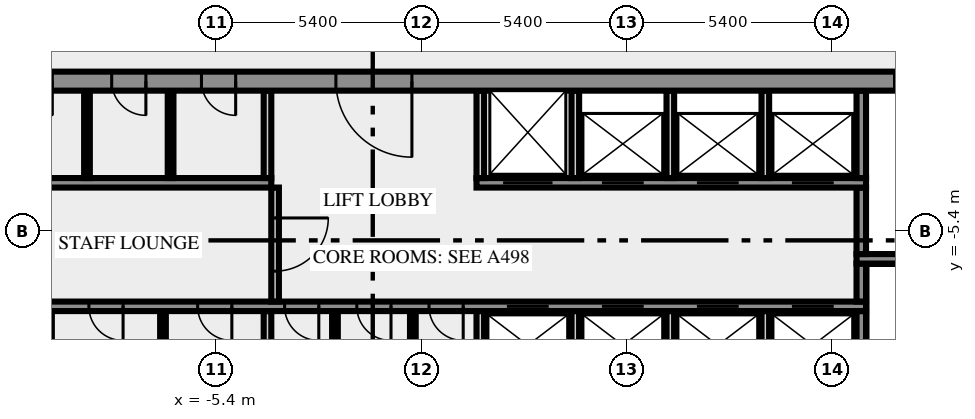
"""IFC4 building model, lengths in metres.
Left out: names, types, materials, properties, quantities, classifications, styles, units other than length and angle.
Written with IfcOpenShell. Run it as: python <this file> out.ifc"""

import sys

from ifc_helpers import new_model, si_unit, direction, frame, frame_2d, origin, place, context, subcontext, project, spatial, rectangle, extrude, element, fill, save


model = new_model("IFC4")
c1 = context("Model", 3, precision=1e-05, world=origin(), true_north=direction((0.0, 1.0)))
c2 = subcontext(c1, "Body", "Model", "MODEL_VIEW")
j1 = project(units=[si_unit("LENGTHUNIT", "METRE"), si_unit("PLANEANGLEUNIT", "RADIAN")], contexts=[c1])
p1 = place(None, origin())
s1 = spatial("IfcSite", under=j1, at=p1, CompositionType="ELEMENT")
p2 = place(p1, origin())
s2 = spatial("IfcBuilding", under=s1, at=p2, CompositionType="ELEMENT")
p3 = place(p2, frame((0.0, 0.0, 226.0)))
s3 = spatial("IfcBuildingStorey", under=s2, at=p3, CompositionType="ELEMENT", Elevation=226.0)
p4 = place(p3, frame((-6.8, -10.5, 0.0), z_axis=(0.0, 0.0, 1.0), x_axis=(0.0, 1.0, 0.0)))
e1 = element("IfcWall", 1, at=p4, inside=s3, PredefinedType="PARTITIONING", context=c2, shape_type="SweptSolid", body=[
    extrude(rectangle(XDim=3.0, YDim=0.15, at=frame_2d((1.5, 0.0))), origin(), (0.0, 0.0, 1.0), 3.65),
])
p5 = place(p3, frame((-4.05, -10.5, 0.0), z_axis=(0.0, 0.0, 1.0), x_axis=(0.0, 1.0, 0.0)))
e2 = element("IfcWall", 2, at=p5, inside=s3, PredefinedType="SOLIDWALL", context=c2, shape_type="SweptSolid", body=[
    extrude(rectangle(XDim=3.0, YDim=0.2, at=frame_2d((1.5, 0.0))), origin(), (0.0, 0.0, 1.0), 3.65),
])
for number, where, z_axis, x_axis in (
    (3, (-2.275, -10.5, 0.0), (0.0, 0.0, 1.0), (0.0, 1.0, 0.0)),
    (4, (-0.225, -10.5, 0.0), (0.0, 0.0, 1.0), (0.0, 1.0, 0.0)),
):
    element("IfcWall", number, at=place(p3, frame(where, z_axis=z_axis, x_axis=x_axis)), inside=s3, PredefinedType="PARTITIONING", context=c2, shape_type="SweptSolid", body=[
        extrude(rectangle(XDim=3.0, YDim=0.15, at=frame_2d((1.5, 0.0))), origin(), (0.0, 0.0, 1.0), 3.65),
    ])
for number, where, z_axis, x_axis in (
    (5, (1.55, -10.5, 0.0), (0.0, 0.0, 1.0), (0.0, 1.0, 0.0)),
    (6, (4.05, -10.5, 0.0), (0.0, 0.0, 1.0), (0.0, 1.0, 0.0)),
    (7, (6.55, -10.5, 0.0), (0.0, 0.0, 1.0), (0.0, 1.0, 0.0)),
    (8, (9.05, -10.5, 0.0), (0.0, 0.0, 1.0), (0.0, 1.0, 0.0)),
):
    element("IfcWall", number, at=place(p3, frame(where, z_axis=z_axis, x_axis=x_axis)), inside=s3, PredefinedType="SOLIDWALL", context=c2, shape_type="SweptSolid", body=[
        extrude(rectangle(XDim=3.0, YDim=0.2, at=frame_2d((1.5, 0.0))), origin(), (0.0, 0.0, 1.0), 3.65),
    ])
p6 = place(p3, frame((11.575, -10.5, 0.0), z_axis=(0.0, 0.0, 1.0), x_axis=(0.0, 1.0, 0.0)))
e9 = element("IfcWall", 9, at=p6, inside=s3, PredefinedType="SHEAR", context=c2, shape_type="SweptSolid", body=[
    extrude(rectangle(XDim=3.0, YDim=0.25, at=frame_2d((1.5, 0.0))), origin(), (0.0, 0.0, 1.0), 3.65),
])
p7 = place(p3, frame((11.7, -7.375, 0.0), z_axis=(0.0, 0.0, 1.0), x_axis=(-1.0, 0.0, 0.0)))
e10 = element("IfcWall", 10, at=p7, inside=s3, PredefinedType="SHEAR", context=c2, shape_type="SweptSolid", body=[
    extrude(rectangle(XDim=23.4, YDim=0.25, at=frame_2d((11.7, 0.0))), origin(), (0.0, 0.0, 1.0), 3.65),
])
p8 = place(p7, frame((21.912, 0.0, 0.0)))
e11 = element("IfcOpeningElement", 11, at=p8, cuts=e10, PredefinedType="OPENING", context=c2, shape_type="SweptSolid", body=[
    extrude(rectangle(XDim=0.9, YDim=2.1, at=frame_2d((0.45, 1.05))), frame((0.0, 0.135, 0.0), z_axis=(0.0, -1.0, 0.0), x_axis=(1.0, 0.0, 0.0)), (0.0, 0.0, 1.0), 0.27),
])
p9 = place(p7, frame((19.55, 0.0, 0.0)))
e12 = element("IfcOpeningElement", 12, at=p9, cuts=e10, PredefinedType="OPENING", context=c2, shape_type="SweptSolid", body=[
    extrude(rectangle(XDim=0.9, YDim=2.1, at=frame_2d((0.45, 1.05))), frame((0.0, 0.135, 0.0), z_axis=(0.0, -1.0, 0.0), x_axis=(1.0, 0.0, 0.0)), (0.0, 0.0, 1.0), 0.27),
])
p10 = place(p7, frame((16.688, 0.0, 0.0)))
e13 = element("IfcOpeningElement", 13, at=p10, cuts=e10, PredefinedType="OPENING", context=c2, shape_type="SweptSolid", body=[
    extrude(rectangle(XDim=0.9, YDim=2.1, at=frame_2d((0.45, 1.05))), frame((0.0, 0.135, 0.0), z_axis=(0.0, -1.0, 0.0), x_axis=(1.0, 0.0, 0.0)), (0.0, 0.0, 1.0), 0.27),
])
p11 = place(p7, frame((14.4, 0.0, 0.0)))
e14 = element("IfcOpeningElement", 14, at=p11, cuts=e10, PredefinedType="OPENING", context=c2, shape_type="SweptSolid", body=[
    extrude(rectangle(XDim=0.9, YDim=2.1, at=frame_2d((0.45, 1.05))), frame((0.0, 0.135, 0.0), z_axis=(0.0, -1.0, 0.0), x_axis=(1.0, 0.0, 0.0)), (0.0, 0.0, 1.0), 0.27),
])
p12 = place(p7, frame((12.5, 0.0, 0.0)))
e15 = element("IfcOpeningElement", 15, at=p12, cuts=e10, PredefinedType="OPENING", context=c2, shape_type="SweptSolid", body=[
    extrude(rectangle(XDim=0.9, YDim=2.1, at=frame_2d((0.45, 1.05))), frame((0.0, 0.135, 0.0), z_axis=(0.0, -1.0, 0.0), x_axis=(1.0, 0.0, 0.0)), (0.0, 0.0, 1.0), 0.27),
])
p13 = place(p7, frame((10.6, 0.0, 0.0)))
e16 = element("IfcOpeningElement", 16, at=p13, cuts=e10, PredefinedType="OPENING", context=c2, shape_type="SweptSolid", body=[
    extrude(rectangle(XDim=0.9, YDim=2.1, at=frame_2d((0.45, 1.05))), frame((0.0, 0.135, 0.0), z_axis=(0.0, -1.0, 0.0), x_axis=(1.0, 0.0, 0.0)), (0.0, 0.0, 1.0), 0.27),
])
p14 = place(p7, frame((8.35, 0.0, 0.0)))
e17 = element("IfcOpeningElement", 17, at=p14, cuts=e10, PredefinedType="OPENING", context=c2, shape_type="SweptSolid", body=[
    extrude(rectangle(XDim=1.1, YDim=2.1, at=frame_2d((0.55, 1.05))), frame((0.0, 0.135, 0.0), z_axis=(0.0, -1.0, 0.0), x_axis=(1.0, 0.0, 0.0)), (0.0, 0.0, 1.0), 0.27),
])
p15 = place(p7, frame((5.85, 0.0, 0.0)))
e18 = element("IfcOpeningElement", 18, at=p15, cuts=e10, PredefinedType="OPENING", context=c2, shape_type="SweptSolid", body=[
    extrude(rectangle(XDim=1.1, YDim=2.1, at=frame_2d((0.55, 1.05))), frame((0.0, 0.135, 0.0), z_axis=(0.0, -1.0, 0.0), x_axis=(1.0, 0.0, 0.0)), (0.0, 0.0, 1.0), 0.27),
])
p16 = place(p7, frame((3.35, 0.0, 0.0)))
e19 = element("IfcOpeningElement", 19, at=p16, cuts=e10, PredefinedType="OPENING", context=c2, shape_type="SweptSolid", body=[
    extrude(rectangle(XDim=1.1, YDim=2.1, at=frame_2d((0.55, 1.05))), frame((0.0, 0.135, 0.0), z_axis=(0.0, -1.0, 0.0), x_axis=(1.0, 0.0, 0.0)), (0.0, 0.0, 1.0), 0.27),
])
p17 = place(p7, frame((0.85, 0.0, 0.0)))
e20 = element("IfcOpeningElement", 20, at=p17, cuts=e10, PredefinedType="OPENING", context=c2, shape_type="SweptSolid", body=[
    extrude(rectangle(XDim=1.1, YDim=2.1, at=frame_2d((0.55, 1.05))), frame((0.0, 0.135, 0.0), z_axis=(0.0, -1.0, 0.0), x_axis=(1.0, 0.0, 0.0)), (0.0, 0.0, 1.0), 0.27),
])
p18 = place(p3, frame((-3.85, -4.25, 0.0), z_axis=(0.0, 0.0, 1.0), x_axis=(0.0, -1.0, 0.0)))
e21 = element("IfcWall", 21, at=p18, inside=s3, PredefinedType="SOLIDWALL", context=c2, shape_type="SweptSolid", body=[
    extrude(rectangle(XDim=3.0, YDim=0.2, at=frame_2d((1.5, 0.0))), origin(), (0.0, 0.0, 1.0), 3.65),
])
p19 = place(p18, frame((0.8, 0.0, 0.0)))
e22 = element("IfcOpeningElement", 22, at=p19, cuts=e21, PredefinedType="OPENING", context=c2, shape_type="SweptSolid", body=[
    extrude(rectangle(XDim=1.4, YDim=2.1, at=frame_2d((0.7, 1.05))), frame((0.0, 0.11, 0.0), z_axis=(0.0, -1.0, 0.0), x_axis=(1.0, 0.0, 0.0)), (0.0, 0.0, 1.0), 0.22),
])
p20 = place(p3, frame((11.575, -7.25, 0.0), z_axis=(0.0, 0.0, 1.0), x_axis=(0.0, 1.0, 0.0)))
e23 = element("IfcWall", 23, at=p20, inside=s3, PredefinedType="SHEAR", context=c2, shape_type="SweptSolid", body=[
    extrude(rectangle(XDim=1.0, YDim=0.25, at=frame_2d((0.5, 0.0))), origin(), (0.0, 0.0, 1.0), 3.65),
])
p21 = place(p3, frame((19.5, -6.125, 0.0), z_axis=(0.0, 0.0, 1.0), x_axis=(-1.0, 0.0, 0.0)))
e24 = element("IfcWall", 24, at=p21, inside=s3, PredefinedType="SHEAR", context=c2, shape_type="SweptSolid", body=[
    extrude(rectangle(XDim=8.05, YDim=0.25, at=frame_2d((4.025, 0.0))), origin(), (0.0, 0.0, 1.0), 3.65),
])
p22 = place(p21, frame((0.05, 0.0, 0.0)))
e25 = element("IfcOpeningElement", 25, at=p22, cuts=e24, PredefinedType="OPENING", context=c2, shape_type="SweptSolid", body=[
    extrude(rectangle(XDim=1.8, YDim=2.1, at=frame_2d((0.9, 1.05))), frame((0.0, 0.135, 0.0), z_axis=(0.0, -1.0, 0.0), x_axis=(1.0, 0.0, 0.0)), (0.0, 0.0, 1.0), 0.27),
])
p23 = place(p3, frame((11.575, -6.0, 0.0), z_axis=(0.0, 0.0, 1.0), x_axis=(0.0, 1.0, 0.0)))
e26 = element("IfcWall", 26, at=p23, inside=s3, PredefinedType="SHEAR", context=c2, shape_type="SweptSolid", body=[
    extrude(rectangle(XDim=1.75, YDim=0.25, at=frame_2d((0.875, 0.0))), origin(), (0.0, 0.0, 1.0), 3.65),
])
p24 = place(p3, frame((-11.7, -4.125, 0.0), z_axis=(0.0, 0.0, 1.0), x_axis=(1.0, 0.0, 0.0)))
e27 = element("IfcWall", 27, at=p24, inside=s3, PredefinedType="SHEAR", context=c2, shape_type="SweptSolid", body=[
    extrude(rectangle(XDim=7.75, YDim=0.25, at=frame_2d((3.875, 0.0))), origin(), (0.0, 0.0, 1.0), 3.65),
])
p25 = place(p3, frame((1.45, -4.125, 0.0), z_axis=(0.0, 0.0, 1.0), x_axis=(1.0, 0.0, 0.0)))
e28 = element("IfcWall", 28, at=p25, inside=s3, PredefinedType="SHEAR", context=c2, shape_type="SweptSolid", body=[
    extrude(rectangle(XDim=10.25, YDim=0.25, at=frame_2d((5.125, 0.0))), origin(), (0.0, 0.0, 1.0), 3.65),
])
p26 = place(p25, frame((0.7, 0.0, 0.0)))
e29 = element("IfcOpeningElement", 29, at=p26, cuts=e28, PredefinedType="OPENING", context=c2, shape_type="SweptSolid", body=[
    extrude(rectangle(XDim=1.3, YDim=2.1, at=frame_2d((0.65, 1.05))), frame((0.0, 0.135, 0.0), z_axis=(0.0, -1.0, 0.0), x_axis=(1.0, 0.0, 0.0)), (0.0, 0.0, 1.0), 0.27),
])
p27 = place(p25, frame((3.3, 0.0, 0.0)))
e30 = element("IfcOpeningElement", 30, at=p27, cuts=e28, PredefinedType="OPENING", context=c2, shape_type="SweptSolid", body=[
    extrude(rectangle(XDim=1.1, YDim=2.1, at=frame_2d((0.55, 1.05))), frame((0.0, 0.135, 0.0), z_axis=(0.0, -1.0, 0.0), x_axis=(1.0, 0.0, 0.0)), (0.0, 0.0, 1.0), 0.27),
])
p28 = place(p25, frame((5.8, 0.0, 0.0)))
e31 = element("IfcOpeningElement", 31, at=p28, cuts=e28, PredefinedType="OPENING", context=c2, shape_type="SweptSolid", body=[
    extrude(rectangle(XDim=1.1, YDim=2.1, at=frame_2d((0.55, 1.05))), frame((0.0, 0.135, 0.0), z_axis=(0.0, -1.0, 0.0), x_axis=(1.0, 0.0, 0.0)), (0.0, 0.0, 1.0), 0.27),
])
p29 = place(p25, frame((8.3, 0.0, 0.0)))
e32 = element("IfcOpeningElement", 32, at=p29, cuts=e28, PredefinedType="OPENING", context=c2, shape_type="SweptSolid", body=[
    extrude(rectangle(XDim=1.1, YDim=2.1, at=frame_2d((0.55, 1.05))), frame((0.0, 0.135, 0.0), z_axis=(0.0, -1.0, 0.0), x_axis=(1.0, 0.0, 0.0)), (0.0, 0.0, 1.0), 0.27),
])
for number, where, z_axis, x_axis in (
    (33, (-8.8, -4.0, 0.0), (0.0, 0.0, 1.0), (0.0, 1.0, 0.0)),
    (34, (-6.6, -4.0, 0.0), (0.0, 0.0, 1.0), (0.0, 1.0, 0.0)),
):
    element("IfcWall", number, at=place(p3, frame(where, z_axis=z_axis, x_axis=x_axis)), inside=s3, PredefinedType="PARTITIONING", context=c2, shape_type="SweptSolid", body=[
        extrude(rectangle(XDim=2.3, YDim=0.15, at=frame_2d((1.15, 0.0))), origin(), (0.0, 0.0, 1.0), 3.65),
    ])
for number, where, z_axis, x_axis in (
    (35, (-4.05, -4.0, 0.0), (0.0, 0.0, 1.0), (0.0, 1.0, 0.0)),
    (36, (1.55, -4.0, 0.0), (0.0, 0.0, 1.0), (0.0, 1.0, 0.0)),
    (37, (4.05, -4.0, 0.0), (0.0, 0.0, 1.0), (0.0, 1.0, 0.0)),
    (38, (6.55, -4.0, 0.0), (0.0, 0.0, 1.0), (0.0, 1.0, 0.0)),
    (39, (9.05, -4.0, 0.0), (0.0, 0.0, 1.0), (0.0, 1.0, 0.0)),
):
    element("IfcWall", number, at=place(p3, frame(where, z_axis=z_axis, x_axis=x_axis)), inside=s3, PredefinedType="SOLIDWALL", context=c2, shape_type="SweptSolid", body=[
        extrude(rectangle(XDim=2.3, YDim=0.2, at=frame_2d((1.15, 0.0))), origin(), (0.0, 0.0, 1.0), 3.65),
    ])
p30 = place(p3, frame((11.575, -4.0, 0.0), z_axis=(0.0, 0.0, 1.0), x_axis=(0.0, 1.0, 0.0)))
e40 = element("IfcWall", 40, at=p30, inside=s3, PredefinedType="SHEAR", context=c2, shape_type="SweptSolid", body=[
    extrude(rectangle(XDim=2.3, YDim=0.25, at=frame_2d((1.15, 0.0))), origin(), (0.0, 0.0, 1.0), 3.65),
])
p31 = place(p3, frame((20.49, -1.45, 0.0), z_axis=(0.0, 0.0, 1.0), x_axis=(-1.0, 0.0, 0.0)))
e41 = element("IfcWall", 41, at=p31, inside=s3, PredefinedType="SHEAR", context=c2, shape_type="SweptSolid", body=[
    extrude(rectangle(XDim=40.98, YDim=0.5, at=frame_2d((20.49, 0.0))), origin(), (0.0, 0.0, 1.0), 3.65),
])
p32 = place(p31, frame((38.14, 0.0, 0.0)))
e42 = element("IfcOpeningElement", 42, at=p32, cuts=e41, PredefinedType="OPENING", context=c2, shape_type="SweptSolid", body=[
    extrude(rectangle(XDim=1.8, YDim=2.1, at=frame_2d((0.9, 1.05))), frame((0.0, 0.26, 0.0), z_axis=(0.0, -1.0, 0.0), x_axis=(1.0, 0.0, 0.0)), (0.0, 0.0, 1.0), 0.52),
])
p33 = place(p31, frame((36.728, 0.0, 0.0)))
e43 = element("IfcOpeningElement", 43, at=p33, cuts=e41, PredefinedType="OPENING", context=c2, shape_type="SweptSolid", body=[
    extrude(rectangle(XDim=0.8, YDim=2.1, at=frame_2d((0.4, 1.05))), frame((0.0, 0.26, 0.0), z_axis=(0.0, -1.0, 0.0), x_axis=(1.0, 0.0, 0.0)), (0.0, 0.0, 1.0), 0.52),
])
p34 = place(p31, frame((35.153, 0.0, 0.0)))
e44 = element("IfcOpeningElement", 44, at=p34, cuts=e41, PredefinedType="OPENING", context=c2, shape_type="SweptSolid", body=[
    extrude(rectangle(XDim=0.8, YDim=2.1, at=frame_2d((0.4, 1.05))), frame((0.0, 0.26, 0.0), z_axis=(0.0, -1.0, 0.0), x_axis=(1.0, 0.0, 0.0)), (0.0, 0.0, 1.0), 0.52),
])
p35 = place(p31, frame((32.94, 0.0, 0.0)))
e45 = element("IfcOpeningElement", 45, at=p35, cuts=e41, PredefinedType="OPENING", context=c2, shape_type="SweptSolid", body=[
    extrude(rectangle(XDim=0.9, YDim=2.1, at=frame_2d((0.45, 1.05))), frame((0.0, 0.26, 0.0), z_axis=(0.0, -1.0, 0.0), x_axis=(1.0, 0.0, 0.0)), (0.0, 0.0, 1.0), 0.52),
])
p36 = place(p31, frame((30.202, 0.0, 0.0)))
e46 = element("IfcOpeningElement", 46, at=p36, cuts=e41, PredefinedType="OPENING", context=c2, shape_type="SweptSolid", body=[
    extrude(rectangle(XDim=0.9, YDim=2.1, at=frame_2d((0.45, 1.05))), frame((0.0, 0.26, 0.0), z_axis=(0.0, -1.0, 0.0), x_axis=(1.0, 0.0, 0.0)), (0.0, 0.0, 1.0), 0.52),
])
p37 = place(p31, frame((27.74, 0.0, 0.0)))
e47 = element("IfcOpeningElement", 47, at=p37, cuts=e41, PredefinedType="OPENING", context=c2, shape_type="SweptSolid", body=[
    extrude(rectangle(XDim=0.9, YDim=2.1, at=frame_2d((0.45, 1.05))), frame((0.0, 0.26, 0.0), z_axis=(0.0, -1.0, 0.0), x_axis=(1.0, 0.0, 0.0)), (0.0, 0.0, 1.0), 0.52),
])
p38 = place(p31, frame((25.377, 0.0, 0.0)))
e48 = element("IfcOpeningElement", 48, at=p38, cuts=e41, PredefinedType="OPENING", context=c2, shape_type="SweptSolid", body=[
    extrude(rectangle(XDim=0.9, YDim=2.1, at=frame_2d((0.45, 1.05))), frame((0.0, 0.26, 0.0), z_axis=(0.0, -1.0, 0.0), x_axis=(1.0, 0.0, 0.0)), (0.0, 0.0, 1.0), 0.52),
])
p39 = place(p31, frame((20.74, 0.0, 0.0)))
e49 = element("IfcOpeningElement", 49, at=p39, cuts=e41, PredefinedType="OPENING", context=c2, shape_type="SweptSolid", body=[
    extrude(rectangle(XDim=2.0, YDim=2.1, at=frame_2d((1.0, 1.05))), frame((0.0, 0.26, 0.0), z_axis=(0.0, -1.0, 0.0), x_axis=(1.0, 0.0, 0.0)), (0.0, 0.0, 1.0), 0.52),
])
p40 = place(p31, frame((7.14, 0.0, 0.0)))
e50 = element("IfcOpeningElement", 50, at=p40, cuts=e41, PredefinedType="OPENING", context=c2, shape_type="SweptSolid", body=[
    extrude(rectangle(XDim=0.9, YDim=2.1, at=frame_2d((0.45, 1.05))), frame((0.0, 0.26, 0.0), z_axis=(0.0, -1.0, 0.0), x_axis=(1.0, 0.0, 0.0)), (0.0, 0.0, 1.0), 0.52),
])
p41 = place(p31, frame((4.19, 0.0, 0.0)))
e51 = element("IfcOpeningElement", 51, at=p41, cuts=e41, PredefinedType="OPENING", context=c2, shape_type="SweptSolid", body=[
    extrude(rectangle(XDim=0.9, YDim=2.1, at=frame_2d((0.45, 1.05))), frame((0.0, 0.26, 0.0), z_axis=(0.0, -1.0, 0.0), x_axis=(1.0, 0.0, 0.0)), (0.0, 0.0, 1.0), 0.52),
])
p42 = place(p31, frame((1.04, 0.0, 0.0)))
e52 = element("IfcOpeningElement", 52, at=p42, cuts=e41, PredefinedType="OPENING", context=c2, shape_type="SweptSolid", body=[
    extrude(rectangle(XDim=1.8, YDim=2.1, at=frame_2d((0.9, 1.05))), frame((0.0, 0.26, 0.0), z_axis=(0.0, -1.0, 0.0), x_axis=(1.0, 0.0, 0.0)), (0.0, 0.0, 1.0), 0.52),
])
p43 = place(p9, origin())
e53 = element("IfcDoor", 53, at=p43, inside=s3, OperationType="SINGLE_SWING_RIGHT", PredefinedType="DOOR", context=c2, shape_type="SweptSolid", body=[
    extrude(rectangle(XDim=0.9, YDim=2.1, at=frame_2d((0.45, 1.05))), frame((0.0, 0.025, 0.0), z_axis=(0.0, -1.0, 0.0), x_axis=(1.0, 0.0, 0.0)), (0.0, 0.0, 1.0), 0.05),
])
fill(e12, e53)
p44 = place(p10, origin())
e54 = element("IfcDoor", 54, at=p44, inside=s3, OperationType="SINGLE_SWING_RIGHT", PredefinedType="DOOR", context=c2, shape_type="SweptSolid", body=[
    extrude(rectangle(XDim=0.9, YDim=2.1, at=frame_2d((0.45, 1.05))), frame((0.0, 0.025, 0.0), z_axis=(0.0, -1.0, 0.0), x_axis=(1.0, 0.0, 0.0)), (0.0, 0.0, 1.0), 0.05),
])
fill(e13, e54)
p45 = place(p11, origin())
e55 = element("IfcDoor", 55, at=p45, inside=s3, OperationType="SINGLE_SWING_RIGHT", PredefinedType="DOOR", context=c2, shape_type="SweptSolid", body=[
    extrude(rectangle(XDim=0.9, YDim=2.1, at=frame_2d((0.45, 1.05))), frame((0.0, 0.025, 0.0), z_axis=(0.0, -1.0, 0.0), x_axis=(1.0, 0.0, 0.0)), (0.0, 0.0, 1.0), 0.05),
])
fill(e14, e55)
p46 = place(p12, origin())
e56 = element("IfcDoor", 56, at=p46, inside=s3, OperationType="SINGLE_SWING_RIGHT", PredefinedType="DOOR", context=c2, shape_type="SweptSolid", body=[
    extrude(rectangle(XDim=0.9, YDim=2.1, at=frame_2d((0.45, 1.05))), frame((0.0, 0.025, 0.0), z_axis=(0.0, -1.0, 0.0), x_axis=(1.0, 0.0, 0.0)), (0.0, 0.0, 1.0), 0.05),
])
fill(e15, e56)
p47 = place(p13, origin())
e57 = element("IfcDoor", 57, at=p47, inside=s3, OperationType="SINGLE_SWING_LEFT", PredefinedType="DOOR", context=c2, shape_type="SweptSolid", body=[
    extrude(rectangle(XDim=0.9, YDim=2.1, at=frame_2d((0.45, 1.05))), frame((0.0, 0.025, 0.0), z_axis=(0.0, -1.0, 0.0), x_axis=(1.0, 0.0, 0.0)), (0.0, 0.0, 1.0), 0.05),
])
fill(e16, e57)
p48 = place(p14, origin())
e58 = element("IfcDoor", 58, at=p48, inside=s3, OperationType="DOUBLE_DOOR_SLIDING", PredefinedType="DOOR", context=c2, shape_type="SweptSolid", body=[
    extrude(rectangle(XDim=1.1, YDim=2.1, at=frame_2d((0.55, 1.05))), frame((0.0, 0.025, 0.0), z_axis=(0.0, -1.0, 0.0), x_axis=(1.0, 0.0, 0.0)), (0.0, 0.0, 1.0), 0.05),
])
fill(e17, e58)
p49 = place(p15, origin())
e59 = element("IfcDoor", 59, at=p49, inside=s3, OperationType="DOUBLE_DOOR_SLIDING", PredefinedType="DOOR", context=c2, shape_type="SweptSolid", body=[
    extrude(rectangle(XDim=1.1, YDim=2.1, at=frame_2d((0.55, 1.05))), frame((0.0, 0.025, 0.0), z_axis=(0.0, -1.0, 0.0), x_axis=(1.0, 0.0, 0.0)), (0.0, 0.0, 1.0), 0.05),
])
fill(e18, e59)
p50 = place(p16, origin())
e60 = element("IfcDoor", 60, at=p50, inside=s3, OperationType="DOUBLE_DOOR_SLIDING", PredefinedType="DOOR", context=c2, shape_type="SweptSolid", body=[
    extrude(rectangle(XDim=1.1, YDim=2.1, at=frame_2d((0.55, 1.05))), frame((0.0, 0.025, 0.0), z_axis=(0.0, -1.0, 0.0), x_axis=(1.0, 0.0, 0.0)), (0.0, 0.0, 1.0), 0.05),
])
fill(e19, e60)
p51 = place(p17, origin())
e61 = element("IfcDoor", 61, at=p51, inside=s3, OperationType="DOUBLE_DOOR_SLIDING", PredefinedType="DOOR", context=c2, shape_type="SweptSolid", body=[
    extrude(rectangle(XDim=1.1, YDim=2.1, at=frame_2d((0.55, 1.05))), frame((0.0, 0.025, 0.0), z_axis=(0.0, -1.0, 0.0), x_axis=(1.0, 0.0, 0.0)), (0.0, 0.0, 1.0), 0.05),
])
fill(e20, e61)
p52 = place(p19, origin())
e62 = element("IfcDoor", 62, at=p52, inside=s3, OperationType="DOUBLE_DOOR_SINGLE_SWING", PredefinedType="DOOR", context=c2, shape_type="SweptSolid", body=[
    extrude(rectangle(XDim=1.4, YDim=2.1, at=frame_2d((0.7, 1.05))), frame((0.0, 0.025, 0.0), z_axis=(0.0, -1.0, 0.0), x_axis=(1.0, 0.0, 0.0)), (0.0, 0.0, 1.0), 0.05),
])
fill(e22, e62)
p53 = place(p26, origin())
e63 = element("IfcDoor", 63, at=p53, inside=s3, OperationType="DOUBLE_DOOR_SLIDING", PredefinedType="DOOR", context=c2, shape_type="SweptSolid", body=[
    extrude(rectangle(XDim=1.3, YDim=2.1, at=frame_2d((0.65, 1.05))), frame((0.0, 0.025, 0.0), z_axis=(0.0, -1.0, 0.0), x_axis=(1.0, 0.0, 0.0)), (0.0, 0.0, 1.0), 0.05),
])
fill(e29, e63)
p54 = place(p27, origin())
e64 = element("IfcDoor", 64, at=p54, inside=s3, OperationType="DOUBLE_DOOR_SLIDING", PredefinedType="DOOR", context=c2, shape_type="SweptSolid", body=[
    extrude(rectangle(XDim=1.1, YDim=2.1, at=frame_2d((0.55, 1.05))), frame((0.0, 0.025, 0.0), z_axis=(0.0, -1.0, 0.0), x_axis=(1.0, 0.0, 0.0)), (0.0, 0.0, 1.0), 0.05),
])
fill(e30, e64)
p55 = place(p28, origin())
e65 = element("IfcDoor", 65, at=p55, inside=s3, OperationType="DOUBLE_DOOR_SLIDING", PredefinedType="DOOR", context=c2, shape_type="SweptSolid", body=[
    extrude(rectangle(XDim=1.1, YDim=2.1, at=frame_2d((0.55, 1.05))), frame((0.0, 0.025, 0.0), z_axis=(0.0, -1.0, 0.0), x_axis=(1.0, 0.0, 0.0)), (0.0, 0.0, 1.0), 0.05),
])
fill(e31, e65)
p56 = place(p29, origin())
e66 = element("IfcDoor", 66, at=p56, inside=s3, OperationType="DOUBLE_DOOR_SLIDING", PredefinedType="DOOR", context=c2, shape_type="SweptSolid", body=[
    extrude(rectangle(XDim=1.1, YDim=2.1, at=frame_2d((0.55, 1.05))), frame((0.0, 0.025, 0.0), z_axis=(0.0, -1.0, 0.0), x_axis=(1.0, 0.0, 0.0)), (0.0, 0.0, 1.0), 0.05),
])
fill(e32, e66)
p57 = place(p36, origin())
e67 = element("IfcDoor", 67, at=p57, inside=s3, OperationType="SINGLE_SWING_RIGHT", PredefinedType="DOOR", context=c2, shape_type="SweptSolid", body=[
    extrude(rectangle(XDim=0.9, YDim=2.1, at=frame_2d((0.45, 1.05))), frame((0.0, 0.025, 0.0), z_axis=(0.0, -1.0, 0.0), x_axis=(1.0, 0.0, 0.0)), (0.0, 0.0, 1.0), 0.05),
])
fill(e46, e67)
p58 = place(p37, origin())
e68 = element("IfcDoor", 68, at=p58, inside=s3, OperationType="SINGLE_SWING_RIGHT", PredefinedType="DOOR", context=c2, shape_type="SweptSolid", body=[
    extrude(rectangle(XDim=0.9, YDim=2.1, at=frame_2d((0.45, 1.05))), frame((0.0, 0.025, 0.0), z_axis=(0.0, -1.0, 0.0), x_axis=(1.0, 0.0, 0.0)), (0.0, 0.0, 1.0), 0.05),
])
fill(e47, e68)
p59 = place(p38, origin())
e69 = element("IfcDoor", 69, at=p59, inside=s3, OperationType="SINGLE_SWING_RIGHT", PredefinedType="DOOR", context=c2, shape_type="SweptSolid", body=[
    extrude(rectangle(XDim=0.9, YDim=2.1, at=frame_2d((0.45, 1.05))), frame((0.0, 0.025, 0.0), z_axis=(0.0, -1.0, 0.0), x_axis=(1.0, 0.0, 0.0)), (0.0, 0.0, 1.0), 0.05),
])
fill(e48, e69)
p60 = place(p39, origin())
e70 = element("IfcDoor", 70, at=p60, inside=s3, OperationType="DOUBLE_DOOR_SINGLE_SWING", PredefinedType="DOOR", context=c2, shape_type="SweptSolid", body=[
    extrude(rectangle(XDim=2.0, YDim=2.1, at=frame_2d((1.0, 1.05))), frame((0.0, 0.025, 0.0), z_axis=(0.0, -1.0, 0.0), x_axis=(1.0, 0.0, 0.0)), (0.0, 0.0, 1.0), 0.05),
])
fill(e49, e70)
save(model, sys.argv[1])
